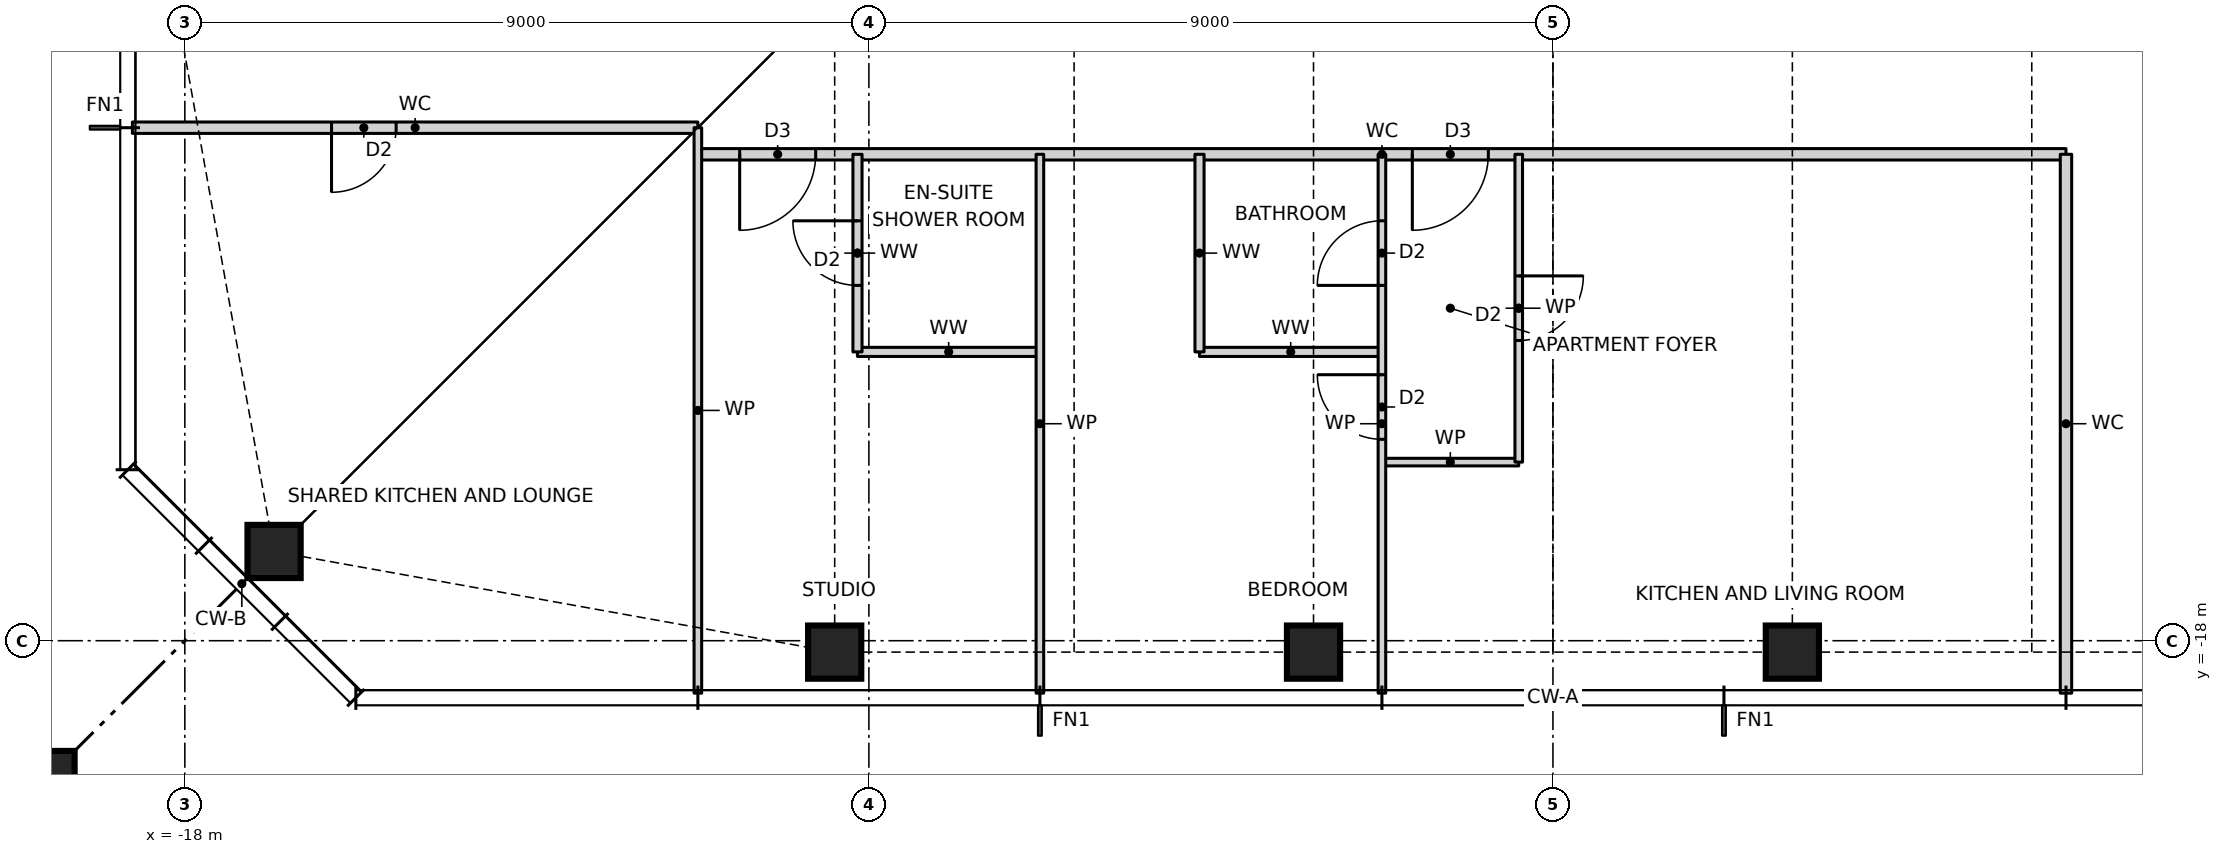
"""IFC4 building model, lengths in metres.
Left out: names, types, materials, properties, quantities, classifications, styles, units other than length and angle.
Written with IfcOpenShell. Run it as: python <this file> out.ifc"""

import sys

from ifc_helpers import new_model, si_unit, direction, frame, frame_2d, origin, origin_2d, place, context, subcontext, project, spatial, rectangle, hollow_rectangle, i_section, extrude, element, fill, save


model = new_model("IFC4")
c1 = context("Model", 3, precision=1e-05, world=origin(), true_north=direction((0.0, 1.0)))
c2 = subcontext(c1, "Body", "Model", "MODEL_VIEW")
j1 = project(units=[si_unit("LENGTHUNIT", "METRE"), si_unit("PLANEANGLEUNIT", "RADIAN")], contexts=[c1])
p1 = place(None, origin())
s1 = spatial("IfcSite", under=j1, at=p1, CompositionType="ELEMENT")
p2 = place(p1, origin())
s2 = spatial("IfcBuilding", under=s1, at=p2, CompositionType="ELEMENT")
p3 = place(p2, frame((0.0, 0.0, 184.5)))
s3 = spatial("IfcBuildingStorey", under=s2, at=p3, CompositionType="ELEMENT", Elevation=184.5)
for number, where, z_axis, x_axis in (
    (1, (-16.826, -16.826, 0.0), (0.0, 0.0, 1.0), (1.0, 0.0, 0.0)),
    (2, (-9.45, -18.15, 0.0), (0.0, 0.0, 1.0), (1.0, 0.0, 0.0)),
    (3, (-3.15, -18.15, 0.0), (0.0, 0.0, 1.0), (1.0, 0.0, 0.0)),
    (4, (3.15, -18.15, 0.0), (0.0, 0.0, 1.0), (1.0, 0.0, 0.0)),
):
    element("IfcColumn", number, at=place(p3, frame(where, z_axis=z_axis, x_axis=x_axis)), inside=s3, PredefinedType="COLUMN", context=c2, shape_type="SweptSolid", body=[
        extrude(hollow_rectangle(XDim=0.7, YDim=0.7, WallThickness=0.06, at=origin_2d()), origin(), (0.0, 0.0, 1.0), 3.5),
    ])
p4 = place(p3, frame((-21.65, -21.65, 0.0), z_axis=(0.0, 0.0, 1.0), x_axis=(1.0, 0.0, 0.0)))
e5 = element("IfcColumn", 5, at=p4, inside=s3, PredefinedType="COLUMN", context=c2, shape_type="SweptSolid", body=[
    extrude(rectangle(XDim=4.4, YDim=4.4, at=origin_2d()), origin(), (0.0, 0.0, 1.0), 3.5),
    extrude(i_section(OverallWidth=0.478, OverallDepth=0.599, WebThickness=0.1, FlangeThickness=0.14, at=origin_2d()), origin(), (0.0, 0.0, 1.0), 3.5),
])
p5 = place(p3, frame((-2.25, -15.65, 0.0), z_axis=(0.0, 0.0, 1.0), x_axis=(1.0, 0.0, 0.0)))
e6 = element("IfcWall", 6, at=p5, inside=s3, PredefinedType="PARTITIONING", context=c2, shape_type="SweptSolid", body=[
    extrude(rectangle(XDim=1.8, YDim=0.1, at=frame_2d((0.9, 0.0))), origin(), (0.0, 0.0, 1.0), 3.27),
])
for number, where, z_axis, x_axis in (
    (7, (-9.15, -14.2, 0.0), (0.0, 0.0, 1.0), (1.0, 0.0, 0.0)),
    (8, (-4.65, -14.2, 0.0), (0.0, 0.0, 1.0), (1.0, 0.0, 0.0)),
):
    element("IfcWall", number, at=place(p3, frame(where, z_axis=z_axis, x_axis=x_axis)), inside=s3, PredefinedType="PARTITIONING", context=c2, shape_type="SweptSolid", body=[
        extrude(rectangle(XDim=2.4, YDim=0.12, at=frame_2d((1.2, 0.0))), origin(), (0.0, 0.0, 1.0), 3.27),
    ])
p6 = place(p3, frame((-11.25, -11.6, 0.0), z_axis=(0.0, 0.0, 1.0), x_axis=(1.0, 0.0, 0.0)))
e9 = element("IfcWall", 9, at=p6, inside=s3, PredefinedType="PARTITIONING", context=c2, shape_type="SweptSolid", body=[
    extrude(rectangle(XDim=18.0, YDim=0.15, at=frame_2d((9.0, 0.0))), origin(), (0.0, 0.0, 1.0), 3.27),
])
p7 = place(p6, frame((0.55, 0.0, 0.0)))
e10 = element("IfcOpeningElement", 10, at=p7, cuts=e9, PredefinedType="OPENING", context=c2, shape_type="SweptSolid", body=[
    extrude(rectangle(XDim=1.0, YDim=2.1, at=frame_2d((0.5, 1.05))), frame((0.0, 0.085, 0.0), z_axis=(0.0, -1.0, 0.0), x_axis=(1.0, 0.0, 0.0)), (0.0, 0.0, 1.0), 0.17),
])
p8 = place(p6, frame((9.4, 0.0, 0.0)))
e11 = element("IfcOpeningElement", 11, at=p8, cuts=e9, PredefinedType="OPENING", context=c2, shape_type="SweptSolid", body=[
    extrude(rectangle(XDim=1.0, YDim=2.1, at=frame_2d((0.5, 1.05))), frame((0.0, 0.085, 0.0), z_axis=(0.0, -1.0, 0.0), x_axis=(1.0, 0.0, 0.0)), (0.0, 0.0, 1.0), 0.17),
])
p9 = place(p3, frame((-18.69, -11.25, 0.0), z_axis=(0.0, 0.0, 1.0), x_axis=(1.0, 0.0, 0.0)))
e12 = element("IfcWall", 12, at=p9, inside=s3, PredefinedType="PARTITIONING", context=c2, shape_type="SweptSolid", body=[
    extrude(rectangle(XDim=7.44, YDim=0.15, at=frame_2d((3.72, 0.0))), origin(), (0.0, 0.0, 1.0), 3.27),
])
p10 = place(p9, frame((2.62, 0.0, 0.0)))
e13 = element("IfcOpeningElement", 13, at=p10, cuts=e12, PredefinedType="OPENING", context=c2, shape_type="SweptSolid", body=[
    extrude(rectangle(XDim=0.85, YDim=2.1, at=frame_2d((0.425, 1.05))), frame((0.0, 0.085, 0.0), z_axis=(0.0, -1.0, 0.0), x_axis=(1.0, 0.0, 0.0)), (0.0, 0.0, 1.0), 0.17),
])
p11 = place(p3, frame((6.75, -18.69, 0.0), z_axis=(0.0, 0.0, 1.0), x_axis=(0.0, 1.0, 0.0)))
e14 = element("IfcWall", 14, at=p11, inside=s3, PredefinedType="PARTITIONING", context=c2, shape_type="SweptSolid", body=[
    extrude(rectangle(XDim=7.09, YDim=0.15, at=frame_2d((3.545, 0.0))), origin(), (0.0, 0.0, 1.0), 3.27),
])
p12 = place(p3, frame((-0.45, -15.65, 0.0), z_axis=(0.0, 0.0, 1.0), x_axis=(0.0, 1.0, 0.0)))
e15 = element("IfcWall", 15, at=p12, inside=s3, PredefinedType="PARTITIONING", context=c2, shape_type="SweptSolid", body=[
    extrude(rectangle(XDim=4.05, YDim=0.1, at=frame_2d((2.025, 0.0))), origin(), (0.0, 0.0, 1.0), 3.27),
])
p13 = place(p12, frame((1.6, 0.0, 0.0)))
e16 = element("IfcOpeningElement", 16, at=p13, cuts=e15, PredefinedType="OPENING", context=c2, shape_type="SweptSolid", body=[
    extrude(rectangle(XDim=0.85, YDim=2.1, at=frame_2d((0.425, 1.05))), frame((0.0, 0.06, 0.0), z_axis=(0.0, -1.0, 0.0), x_axis=(1.0, 0.0, 0.0)), (0.0, 0.0, 1.0), 0.12),
])
p14 = place(p3, frame((-2.25, -18.69, 0.0), z_axis=(0.0, 0.0, 1.0), x_axis=(0.0, 1.0, 0.0)))
e17 = element("IfcWall", 17, at=p14, inside=s3, PredefinedType="PARTITIONING", context=c2, shape_type="SweptSolid", body=[
    extrude(rectangle(XDim=7.09, YDim=0.1, at=frame_2d((3.545, 0.0))), origin(), (0.0, 0.0, 1.0), 3.27),
])
p15 = place(p14, frame((3.34, 0.0, 0.0)))
e18 = element("IfcOpeningElement", 18, at=p15, cuts=e17, PredefinedType="OPENING", context=c2, shape_type="SweptSolid", body=[
    extrude(rectangle(XDim=0.85, YDim=2.1, at=frame_2d((0.425, 1.05))), frame((0.0, 0.06, 0.0), z_axis=(0.0, -1.0, 0.0), x_axis=(1.0, 0.0, 0.0)), (0.0, 0.0, 1.0), 0.12),
])
p16 = place(p14, frame((5.365, 0.0, 0.0)))
e19 = element("IfcOpeningElement", 19, at=p16, cuts=e17, PredefinedType="OPENING", context=c2, shape_type="SweptSolid", body=[
    extrude(rectangle(XDim=0.85, YDim=2.1, at=frame_2d((0.425, 1.05))), frame((0.0, 0.06, 0.0), z_axis=(0.0, -1.0, 0.0), x_axis=(1.0, 0.0, 0.0)), (0.0, 0.0, 1.0), 0.12),
])
p17 = place(p3, frame((-4.65, -14.2, 0.0), z_axis=(0.0, 0.0, 1.0), x_axis=(0.0, 1.0, 0.0)))
e20 = element("IfcWall", 20, at=p17, inside=s3, PredefinedType="PARTITIONING", context=c2, shape_type="SweptSolid", body=[
    extrude(rectangle(XDim=2.6, YDim=0.12, at=frame_2d((1.3, 0.0))), origin(), (0.0, 0.0, 1.0), 3.27),
])
p18 = place(p3, frame((-6.75, -18.69, 0.0), z_axis=(0.0, 0.0, 1.0), x_axis=(0.0, 1.0, 0.0)))
e21 = element("IfcWall", 21, at=p18, inside=s3, PredefinedType="PARTITIONING", context=c2, shape_type="SweptSolid", body=[
    extrude(rectangle(XDim=7.09, YDim=0.1, at=frame_2d((3.545, 0.0))), origin(), (0.0, 0.0, 1.0), 3.27),
])
p19 = place(p3, frame((-9.15, -14.2, 0.0), z_axis=(0.0, 0.0, 1.0), x_axis=(0.0, 1.0, 0.0)))
e22 = element("IfcWall", 22, at=p19, inside=s3, PredefinedType="PARTITIONING", context=c2, shape_type="SweptSolid", body=[
    extrude(rectangle(XDim=2.6, YDim=0.12, at=frame_2d((1.3, 0.0))), origin(), (0.0, 0.0, 1.0), 3.27),
])
p20 = place(p19, frame((0.875, 0.0, 0.0)))
e23 = element("IfcOpeningElement", 23, at=p20, cuts=e22, PredefinedType="OPENING", context=c2, shape_type="SweptSolid", body=[
    extrude(rectangle(XDim=0.85, YDim=2.1, at=frame_2d((0.425, 1.05))), frame((0.0, 0.07, 0.0), z_axis=(0.0, -1.0, 0.0), x_axis=(1.0, 0.0, 0.0)), (0.0, 0.0, 1.0), 0.14),
])
p21 = place(p3, frame((-11.25, -18.69, 0.0), z_axis=(0.0, 0.0, 1.0), x_axis=(0.0, 1.0, 0.0)))
e24 = element("IfcWall", 24, at=p21, inside=s3, PredefinedType="PARTITIONING", context=c2, shape_type="SweptSolid", body=[
    extrude(rectangle(XDim=7.44, YDim=0.1, at=frame_2d((3.72, 0.0))), origin(), (0.0, 0.0, 1.0), 3.27),
])
p22 = place(p7, frame((1.0, 0.0, 0.0), z_axis=(0.0, 0.0, 1.0), x_axis=(-1.0, 0.0, 0.0)))
e25 = element("IfcDoor", 25, at=p22, inside=s3, OperationType="SINGLE_SWING_RIGHT", PredefinedType="DOOR", context=c2, shape_type="SweptSolid", body=[
    extrude(rectangle(XDim=1.0, YDim=2.1, at=frame_2d((0.5, 1.05))), frame((0.0, 0.025, 0.0), z_axis=(0.0, -1.0, 0.0), x_axis=(1.0, 0.0, 0.0)), (0.0, 0.0, 1.0), 0.05),
])
fill(e10, e25)
p23 = place(p20, origin())
e26 = element("IfcDoor", 26, at=p23, inside=s3, OperationType="SINGLE_SWING_RIGHT", PredefinedType="DOOR", context=c2, shape_type="SweptSolid", body=[
    extrude(rectangle(XDim=0.85, YDim=2.1, at=frame_2d((0.425, 1.05))), frame((0.0, 0.025, 0.0), z_axis=(0.0, -1.0, 0.0), x_axis=(1.0, 0.0, 0.0)), (0.0, 0.0, 1.0), 0.05),
])
fill(e23, e26)
p24 = place(p8, frame((1.0, 0.0, 0.0), z_axis=(0.0, 0.0, 1.0), x_axis=(-1.0, 0.0, 0.0)))
e27 = element("IfcDoor", 27, at=p24, inside=s3, OperationType="SINGLE_SWING_RIGHT", PredefinedType="DOOR", context=c2, shape_type="SweptSolid", body=[
    extrude(rectangle(XDim=1.0, YDim=2.1, at=frame_2d((0.5, 1.05))), frame((0.0, 0.025, 0.0), z_axis=(0.0, -1.0, 0.0), x_axis=(1.0, 0.0, 0.0)), (0.0, 0.0, 1.0), 0.05),
])
fill(e11, e27)
p25 = place(p13, frame((0.85, 0.0, 0.0), z_axis=(0.0, 0.0, 1.0), x_axis=(-1.0, 0.0, 0.0)))
e28 = element("IfcDoor", 28, at=p25, inside=s3, OperationType="SINGLE_SWING_LEFT", PredefinedType="DOOR", context=c2, shape_type="SweptSolid", body=[
    extrude(rectangle(XDim=0.85, YDim=2.1, at=frame_2d((0.425, 1.05))), frame((0.0, 0.025, 0.0), z_axis=(0.0, -1.0, 0.0), x_axis=(1.0, 0.0, 0.0)), (0.0, 0.0, 1.0), 0.05),
])
fill(e16, e28)
p26 = place(p15, origin())
e29 = element("IfcDoor", 29, at=p26, inside=s3, OperationType="SINGLE_SWING_RIGHT", PredefinedType="DOOR", context=c2, shape_type="SweptSolid", body=[
    extrude(rectangle(XDim=0.85, YDim=2.1, at=frame_2d((0.425, 1.05))), frame((0.0, 0.025, 0.0), z_axis=(0.0, -1.0, 0.0), x_axis=(1.0, 0.0, 0.0)), (0.0, 0.0, 1.0), 0.05),
])
fill(e18, e29)
p27 = place(p16, origin())
e30 = element("IfcDoor", 30, at=p27, inside=s3, OperationType="SINGLE_SWING_LEFT", PredefinedType="DOOR", context=c2, shape_type="SweptSolid", body=[
    extrude(rectangle(XDim=0.85, YDim=2.1, at=frame_2d((0.425, 1.05))), frame((0.0, 0.025, 0.0), z_axis=(0.0, -1.0, 0.0), x_axis=(1.0, 0.0, 0.0)), (0.0, 0.0, 1.0), 0.05),
])
fill(e19, e30)
p28 = place(p10, frame((0.85, 0.0, 0.0), z_axis=(0.0, 0.0, 1.0), x_axis=(-1.0, 0.0, 0.0)))
e31 = element("IfcDoor", 31, at=p28, inside=s3, OperationType="SINGLE_SWING_RIGHT", PredefinedType="DOOR", context=c2, shape_type="SweptSolid", body=[
    extrude(rectangle(XDim=0.85, YDim=2.1, at=frame_2d((0.425, 1.05))), frame((0.0, 0.025, 0.0), z_axis=(0.0, -1.0, 0.0), x_axis=(1.0, 0.0, 0.0)), (0.0, 0.0, 1.0), 0.05),
])
fill(e13, e31)
save(model, sys.argv[1])
